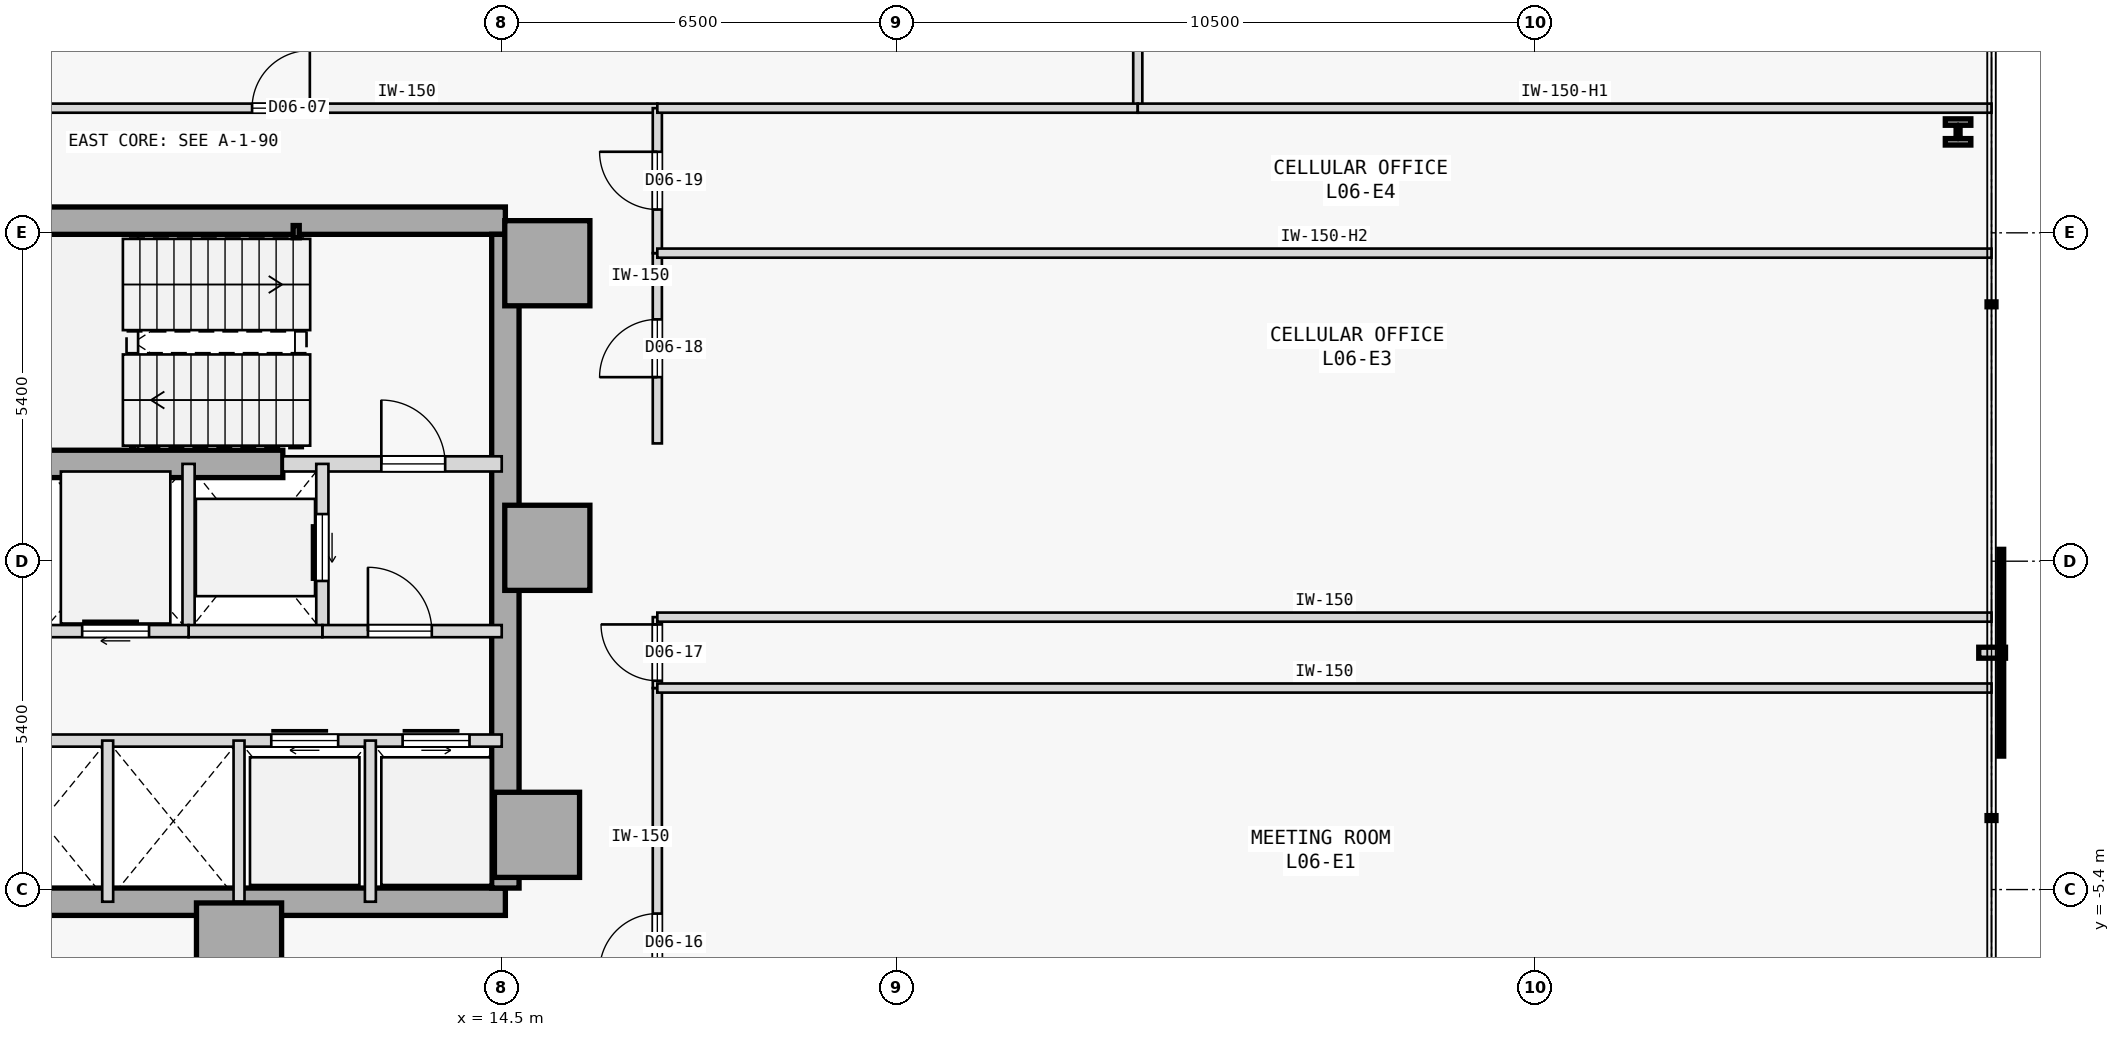
"""IFC4 building model, lengths in metres.
Left out: names, types, materials, properties, quantities, classifications, styles, units other than length and angle.
Written with IfcOpenShell. Run it as: python <this file> out.ifc"""

import sys

from ifc_helpers import new_model, si_unit, direction, frame, frame_2d, origin, origin_2d, place, context, subcontext, project, spatial, rectangle, hollow_rectangle, i_section, extrude, element, fill, save


model = new_model("IFC4")
c1 = context("Model", 3, precision=1e-05, world=origin(), true_north=direction((0.0, 1.0)))
c2 = subcontext(c1, "Body", "Model", "MODEL_VIEW")
j1 = project(units=[si_unit("LENGTHUNIT", "METRE"), si_unit("PLANEANGLEUNIT", "RADIAN")], contexts=[c1])
p1 = place(None, origin())
s1 = spatial("IfcSite", under=j1, at=p1, CompositionType="ELEMENT")
p2 = place(p1, origin())
s2 = spatial("IfcBuilding", under=s1, at=p2, CompositionType="ELEMENT")
p3 = place(p2, frame((0.0, 0.0, 29.4)))
s3 = spatial("IfcBuildingStorey", under=s2, at=p3, CompositionType="ELEMENT", Elevation=29.4)
for number, where, z_axis, x_axis in (
    (1, (15.25, 4.9, 0.0), (0.0, 0.0, 1.0), (1.0, 0.0, 0.0)),
    (2, (15.25, 0.22, 0.0), (0.0, 0.0, 1.0), (1.0, 0.0, 0.0)),
    (3, (15.08, -4.5, 0.0), (0.0, 0.0, 1.0), (1.0, 0.0, 0.0)),
    (4, (10.18, -6.32, 0.0), (0.0, 0.0, 1.0), (1.0, 0.0, 0.0)),
):
    element("IfcColumn", number, at=place(p3, frame(where, z_axis=z_axis, x_axis=x_axis)), inside=s3, PredefinedType="COLUMN", context=c2, shape_type="SweptSolid", body=[
        extrude(rectangle(XDim=1.4, YDim=1.4, at=origin_2d()), origin(), (0.0, 0.0, 1.0), 3.8),
    ])
p4 = place(p3, frame((3.15, 5.6, 0.0), z_axis=(0.0, 0.0, 1.0), x_axis=(1.0, 0.0, 0.0)))
e5 = element("IfcWall", 5, at=p4, inside=s3, PredefinedType="SHEAR", context=c2, shape_type="SweptSolid", body=[
    extrude(rectangle(XDim=11.41, YDim=0.45, at=frame_2d((5.705, 0.0))), origin(), (0.0, 0.0, 1.0), 3.575),
])
p5 = place(p3, frame((3.7, -5.6, 0.0), z_axis=(0.0, 0.0, 1.0), x_axis=(1.0, 0.0, 0.0)))
e6 = element("IfcWall", 6, at=p5, inside=s3, PredefinedType="SHEAR", context=c2, shape_type="SweptSolid", body=[
    extrude(rectangle(XDim=10.86, YDim=0.45, at=frame_2d((5.43, 0.0))), origin(), (0.0, 0.0, 1.0), 3.575),
])
p6 = place(p3, frame((14.56, -5.375, 0.0), z_axis=(0.0, 0.0, 1.0), x_axis=(0.0, 1.0, 0.0)))
e7 = element("IfcWall", 7, at=p6, inside=s3, PredefinedType="SHEAR", context=c2, shape_type="SweptSolid", body=[
    extrude(rectangle(XDim=10.75, YDim=0.45, at=frame_2d((5.375, 0.0))), origin(), (0.0, 0.0, 1.0), 3.575),
])
p7 = place(p3, frame((5.75, 1.6, 0.0), z_axis=(0.0, 0.0, 1.0), x_axis=(1.0, 0.0, 0.0)))
e8 = element("IfcWall", 8, at=p7, inside=s3, PredefinedType="SHEAR", context=c2, shape_type="SweptSolid", body=[
    extrude(rectangle(XDim=5.15, YDim=0.45, at=frame_2d((2.575, 0.0))), origin(), (0.0, 0.0, 1.0), 3.575),
])
p8 = place(p3, frame((11.12, 5.42, 0.0), z_axis=(0.0, 0.0, 1.0), x_axis=(1.0, 0.0, 0.0)))
e9 = element("IfcColumn", 9, at=p8, inside=s3, PredefinedType="COLUMN", context=c2, shape_type="SweptSolid", body=[
    extrude(hollow_rectangle(XDim=0.1, YDim=0.2, WallThickness=0.008, at=origin_2d()), origin(), (0.0, 0.0, 1.0), 3.8),
])
p9 = place(p3, frame((38.45, 7.059, 0.0), z_axis=(0.0, 0.0, 1.0), x_axis=(1.0, 0.0, 0.0)))
e10 = element("IfcColumn", 10, at=p9, inside=s3, PredefinedType="COLUMN", context=c2, shape_type="SweptSolid", body=[
    extrude(i_section(OverallWidth=0.42, OverallDepth=0.431, WebThickness=0.065, FlangeThickness=0.106, FilletRadius=0.015, at=origin_2d()), origin(), (0.0, 0.0, 1.0), 3.8),
])
p10 = place(p3, frame((10.9, 1.6, 0.0), z_axis=(0.0, 0.0, 1.0), x_axis=(1.0, 0.0, 0.0)))
e11 = element("IfcWall", 11, at=p10, inside=s3, PredefinedType="STANDARD", context=c2, shape_type="SweptSolid", body=[
    extrude(rectangle(XDim=3.6, YDim=0.25, at=frame_2d((1.8, 0.0))), origin(), (0.0, 0.0, 1.0), 3.575),
])
p11 = place(p10, frame((1.62, 0.0, 0.0)))
e12 = element("IfcOpeningElement", 12, at=p11, cuts=e11, PredefinedType="OPENING", context=c2, shape_type="SweptSolid", body=[
    extrude(rectangle(XDim=1.05, YDim=2.15, at=frame_2d((0.525, 1.075))), frame((0.0, 0.135, 0.0), z_axis=(0.0, -1.0, 0.0), x_axis=(1.0, 0.0, 0.0)), (0.0, 0.0, 1.0), 0.27),
])
p12 = place(p3, frame((11.55, -1.15, 0.0), z_axis=(0.0, 0.0, 1.0), x_axis=(0.0, 1.0, 0.0)))
e13 = element("IfcWall", 13, at=p12, inside=s3, PredefinedType="STANDARD", context=c2, shape_type="SweptSolid", body=[
    extrude(rectangle(XDim=2.75, YDim=0.2, at=frame_2d((1.375, 0.0))), origin(), (0.0, 0.0, 1.0), 3.575),
])
p13 = place(p12, frame((0.825, 0.0, 0.0)))
e14 = element("IfcOpeningElement", 14, at=p13, cuts=e13, PredefinedType="OPENING", context=c2, shape_type="SweptSolid", body=[
    extrude(rectangle(XDim=1.1, YDim=2.15, at=frame_2d((0.55, 1.075))), frame((0.0, 0.11, 0.0), z_axis=(0.0, -1.0, 0.0), x_axis=(1.0, 0.0, 0.0)), (0.0, 0.0, 1.0), 0.22),
])
p14 = place(p3, frame((9.35, -1.15, 0.0), z_axis=(0.0, 0.0, 1.0), x_axis=(0.0, 1.0, 0.0)))
e15 = element("IfcWall", 15, at=p14, inside=s3, PredefinedType="STANDARD", context=c2, shape_type="SweptSolid", body=[
    extrude(rectangle(XDim=2.75, YDim=0.2, at=frame_2d((1.375, 0.0))), origin(), (0.0, 0.0, 1.0), 3.575),
])
p15 = place(p3, frame((11.55, -1.15, 0.0), z_axis=(0.0, 0.0, 1.0), x_axis=(1.0, 0.0, 0.0)))
e16 = element("IfcWall", 16, at=p15, inside=s3, PredefinedType="STANDARD", context=c2, shape_type="SweptSolid", body=[
    extrude(rectangle(XDim=2.95, YDim=0.2, at=frame_2d((1.475, 0.0))), origin(), (0.0, 0.0, 1.0), 3.575),
])
p16 = place(p15, frame((0.75, 0.0, 0.0)))
e17 = element("IfcOpeningElement", 17, at=p16, cuts=e16, PredefinedType="OPENING", context=c2, shape_type="SweptSolid", body=[
    extrude(rectangle(XDim=1.05, YDim=2.18, at=frame_2d((0.525, 1.09))), frame((0.0, 0.11, 0.0), z_axis=(0.0, -1.0, 0.0), x_axis=(1.0, 0.0, 0.0)), (0.0, 0.0, 1.0), 0.22),
])
p17 = place(p3, frame((9.35, -1.15, 0.0), z_axis=(0.0, 0.0, 1.0), x_axis=(1.0, 0.0, 0.0)))
e18 = element("IfcWall", 18, at=p17, inside=s3, PredefinedType="STANDARD", context=c2, shape_type="SweptSolid", body=[
    extrude(rectangle(XDim=2.2, YDim=0.2, at=frame_2d((1.1, 0.0))), origin(), (0.0, 0.0, 1.0), 3.575),
])
p18 = place(p3, frame((6.95, -1.15, 0.0), z_axis=(0.0, 0.0, 1.0), x_axis=(1.0, 0.0, 0.0)))
e19 = element("IfcWall", 19, at=p18, inside=s3, PredefinedType="STANDARD", context=c2, shape_type="SweptSolid", body=[
    extrude(rectangle(XDim=2.4, YDim=0.2, at=frame_2d((1.2, 0.0))), origin(), (0.0, 0.0, 1.0), 3.575),
])
p19 = place(p18, frame((0.65, 0.0, 0.0)))
e20 = element("IfcOpeningElement", 20, at=p19, cuts=e19, PredefinedType="OPENING", context=c2, shape_type="SweptSolid", body=[
    extrude(rectangle(XDim=1.1, YDim=2.15, at=frame_2d((0.55, 1.075))), frame((0.0, 0.11, 0.0), z_axis=(0.0, -1.0, 0.0), x_axis=(1.0, 0.0, 0.0)), (0.0, 0.0, 1.0), 0.22),
])
p20 = place(p3, frame((3.7, -2.95, 0.0), z_axis=(0.0, 0.0, 1.0), x_axis=(1.0, 0.0, 0.0)))
e21 = element("IfcWall", 21, at=p20, inside=s3, PredefinedType="STANDARD", context=c2, shape_type="SweptSolid", body=[
    extrude(rectangle(XDim=10.8, YDim=0.2, at=frame_2d((5.4, 0.0))), origin(), (0.0, 0.0, 1.0), 3.575),
])
p21 = place(p20, frame((7.01, 0.0, 0.0)))
e22 = element("IfcOpeningElement", 22, at=p21, cuts=e21, PredefinedType="OPENING", context=c2, shape_type="SweptSolid", body=[
    extrude(rectangle(XDim=1.1, YDim=2.15, at=frame_2d((0.55, 1.075))), frame((0.0, 0.11, 0.0), z_axis=(0.0, -1.0, 0.0), x_axis=(1.0, 0.0, 0.0)), (0.0, 0.0, 1.0), 0.22),
])
p22 = place(p20, frame((9.17, 0.0, 0.0)))
e23 = element("IfcOpeningElement", 23, at=p22, cuts=e21, PredefinedType="OPENING", context=c2, shape_type="SweptSolid", body=[
    extrude(rectangle(XDim=1.1, YDim=2.15, at=frame_2d((0.55, 1.075))), frame((0.0, 0.11, 0.0), z_axis=(0.0, -1.0, 0.0), x_axis=(1.0, 0.0, 0.0)), (0.0, 0.0, 1.0), 0.22),
])
for number, where, z_axis, x_axis in (
    (24, (12.34, -5.6, 0.0), (0.0, 0.0, 1.0), (0.0, 1.0, 0.0)),
    (25, (10.18, -5.6, 0.0), (0.0, 0.0, 1.0), (0.0, 1.0, 0.0)),
    (26, (8.02, -5.6, 0.0), (0.0, 0.0, 1.0), (0.0, 1.0, 0.0)),
):
    element("IfcWall", number, at=place(p3, frame(where, z_axis=z_axis, x_axis=x_axis)), inside=s3, PredefinedType="STANDARD", context=c2, shape_type="SweptSolid", body=[
        extrude(rectangle(XDim=2.65, YDim=0.18, at=frame_2d((1.325, 0.0))), origin(), (0.0, 0.0, 1.0), 3.575),
    ])
p23 = place(p3, frame((4.68, 7.45, 0.0), z_axis=(0.0, 0.0, 1.0), x_axis=(1.0, 0.0, 0.0)))
e27 = element("IfcWall", 27, at=p23, inside=s3, PredefinedType="PARTITIONING", context=c2, shape_type="SweptSolid", body=[
    extrude(rectangle(XDim=12.379, YDim=0.15, at=frame_2d((6.189, 0.0))), origin(), (0.0, 0.0, 1.0), 3.575),
])
p24 = place(p23, frame((5.715, 0.0, 0.0)))
e28 = element("IfcOpeningElement", 28, at=p24, cuts=e27, PredefinedType="OPENING", context=c2, shape_type="SweptSolid", body=[
    extrude(rectangle(XDim=0.95, YDim=2.15, at=frame_2d((0.475, 1.075))), frame((0.0, 0.085, 0.0), z_axis=(0.0, -1.0, 0.0), x_axis=(1.0, 0.0, 0.0)), (0.0, 0.0, 1.0), 0.17),
])
p25 = place(p3, frame((17.059, -7.45, 0.0), z_axis=(0.0, 0.0, 1.0), x_axis=(0.0, 1.0, 0.0)))
e29 = element("IfcWall", 29, at=p25, inside=s3, PredefinedType="PARTITIONING", context=c2, shape_type="SweptSolid", body=[
    extrude(rectangle(XDim=5.364, YDim=0.15, at=frame_2d((2.682, 0.0))), origin(), (0.0, 0.0, 1.0), 3.575),
])
p26 = place(p25, frame((0.705, 0.0, 0.0)))
e30 = element("IfcOpeningElement", 30, at=p26, cuts=e29, PredefinedType="OPENING", context=c2, shape_type="SweptSolid", body=[
    extrude(rectangle(XDim=0.95, YDim=2.15, at=frame_2d((0.475, 1.075))), frame((0.0, 0.085, 0.0), z_axis=(0.0, -1.0, 0.0), x_axis=(1.0, 0.0, 0.0)), (0.0, 0.0, 1.0), 0.17),
])
p27 = place(p3, frame((17.059, -2.086, 0.0), z_axis=(0.0, 0.0, 1.0), x_axis=(0.0, 1.0, 0.0)))
e31 = element("IfcWall", 31, at=p27, inside=s3, PredefinedType="PARTITIONING", context=c2, shape_type="SweptSolid", body=[
    extrude(rectangle(XDim=1.166, YDim=0.15, at=frame_2d((0.583, 0.0))), origin(), (0.0, 0.0, 1.0), 3.575),
])
p28 = place(p27, frame((0.12, 0.0, 0.0)))
e32 = element("IfcOpeningElement", 32, at=p28, cuts=e31, PredefinedType="OPENING", context=c2, shape_type="SweptSolid", body=[
    extrude(rectangle(XDim=0.926, YDim=2.15, at=frame_2d((0.463, 1.075))), frame((0.0, 0.085, 0.0), z_axis=(0.0, -1.0, 0.0), x_axis=(1.0, 0.0, 0.0)), (0.0, 0.0, 1.0), 0.17),
])
p29 = place(p3, frame((17.059, -0.92, 0.0), z_axis=(0.0, 0.0, 1.0), x_axis=(1.0, 0.0, 0.0)))
e33 = element("IfcWall", 33, at=p29, inside=s3, PredefinedType="PARTITIONING", context=c2, shape_type="SweptSolid", body=[
    extrude(rectangle(XDim=21.941, YDim=0.15, at=frame_2d((10.97, 0.0))), origin(), (0.0, 0.0, 1.0), 3.575),
])
p30 = place(p3, frame((17.059, 1.937, 0.0), z_axis=(0.0, 0.0, 1.0), x_axis=(0.0, 1.0, 0.0)))
e34 = element("IfcWall", 34, at=p30, inside=s3, PredefinedType="PARTITIONING", context=c2, shape_type="SweptSolid", body=[
    extrude(rectangle(XDim=3.129, YDim=0.15, at=frame_2d((1.564, 0.0))), origin(), (0.0, 0.0, 1.0), 3.575),
])
p31 = place(p30, frame((1.09, 0.0, 0.0)))
e35 = element("IfcOpeningElement", 35, at=p31, cuts=e34, PredefinedType="OPENING", context=c2, shape_type="SweptSolid", body=[
    extrude(rectangle(XDim=0.95, YDim=2.15, at=frame_2d((0.475, 1.075))), frame((0.0, 0.085, 0.0), z_axis=(0.0, -1.0, 0.0), x_axis=(1.0, 0.0, 0.0)), (0.0, 0.0, 1.0), 0.17),
])
p32 = place(p3, frame((17.059, 5.066, 0.0), z_axis=(0.0, 0.0, 1.0), x_axis=(0.0, 1.0, 0.0)))
e36 = element("IfcWall", 36, at=p32, inside=s3, PredefinedType="PARTITIONING", context=c2, shape_type="SweptSolid", body=[
    extrude(rectangle(XDim=2.384, YDim=0.15, at=frame_2d((1.192, 0.0))), origin(), (0.0, 0.0, 1.0), 3.575),
])
p33 = place(p32, frame((0.717, 0.0, 0.0)))
e37 = element("IfcOpeningElement", 37, at=p33, cuts=e36, PredefinedType="OPENING", context=c2, shape_type="SweptSolid", body=[
    extrude(rectangle(XDim=0.95, YDim=2.15, at=frame_2d((0.475, 1.075))), frame((0.0, 0.085, 0.0), z_axis=(0.0, -1.0, 0.0), x_axis=(1.0, 0.0, 0.0)), (0.0, 0.0, 1.0), 0.17),
])
p34 = place(p3, frame((24.96, 7.45, 0.0), z_axis=(0.0, 0.0, 1.0), x_axis=(0.0, 1.0, 0.0)))
e38 = element("IfcWall", 38, at=p34, inside=s3, PredefinedType="PARTITIONING", context=c2, shape_type="SweptSolid", body=[
    extrude(rectangle(XDim=17.55, YDim=0.15, at=frame_2d((8.775, 0.0))), origin(), (0.0, 0.0, 1.0), 3.575),
])
p35 = place(p34, frame((8.3, 0.0, 0.0)))
e39 = element("IfcOpeningElement", 39, at=p35, cuts=e38, PredefinedType="OPENING", context=c2, shape_type="SweptSolid", body=[
    extrude(rectangle(XDim=0.95, YDim=2.15, at=frame_2d((0.475, 1.075))), frame((0.0, 0.085, 0.0), z_axis=(0.0, -1.0, 0.0), x_axis=(1.0, 0.0, 0.0)), (0.0, 0.0, 1.0), 0.17),
])
p36 = place(p3, frame((17.059, 7.45, 0.0), z_axis=(0.0, 0.0, 1.0), x_axis=(1.0, 0.0, 0.0)))
e40 = element("IfcWall", 40, at=p36, inside=s3, PredefinedType="PARTITIONING", context=c2, shape_type="SweptSolid", body=[
    extrude(rectangle(XDim=7.901, YDim=0.15, at=frame_2d((3.95, 0.0))), origin(), (0.0, 0.0, 1.0), 3.575),
])
p37 = place(p3, frame((24.96, 7.45, 0.0), z_axis=(0.0, 0.0, 1.0), x_axis=(1.0, 0.0, 0.0)))
e41 = element("IfcWall", 41, at=p37, inside=s3, PredefinedType="PARTITIONING", context=c2, shape_type="SweptSolid", body=[
    extrude(rectangle(XDim=14.04, YDim=0.15, at=frame_2d((7.02, 0.0))), origin(), (0.0, 0.0, 1.0), 3.125),
])
p38 = place(p3, frame((17.059, -2.086, 0.0), z_axis=(0.0, 0.0, 1.0), x_axis=(1.0, 0.0, 0.0)))
e42 = element("IfcWall", 42, at=p38, inside=s3, PredefinedType="PARTITIONING", context=c2, shape_type="SweptSolid", body=[
    extrude(rectangle(XDim=21.941, YDim=0.15, at=frame_2d((10.97, 0.0))), origin(), (0.0, 0.0, 1.0), 3.575),
])
p39 = place(p3, frame((17.059, 5.066, 0.0), z_axis=(0.0, 0.0, 1.0), x_axis=(1.0, 0.0, 0.0)))
e43 = element("IfcWall", 43, at=p39, inside=s3, PredefinedType="PARTITIONING", context=c2, shape_type="SweptSolid", body=[
    extrude(rectangle(XDim=21.941, YDim=0.15, at=frame_2d((10.97, 0.0))), origin(), (0.0, 0.0, 1.0), 2.975),
])
p40 = place(p11, origin())
e44 = element("IfcDoor", 44, at=p40, inside=s3, OperationType="SINGLE_SWING_LEFT", PredefinedType="DOOR", context=c2, shape_type="SweptSolid", body=[
    extrude(rectangle(XDim=1.05, YDim=2.15, at=frame_2d((0.525, 1.075))), frame((0.0, 0.025, 0.0), z_axis=(0.0, -1.0, 0.0), x_axis=(1.0, 0.0, 0.0)), (0.0, 0.0, 1.0), 0.05),
])
fill(e12, e44)
p41 = place(p16, origin())
e45 = element("IfcDoor", 45, at=p41, inside=s3, OperationType="SINGLE_SWING_LEFT", PredefinedType="DOOR", context=c2, shape_type="SweptSolid", body=[
    extrude(rectangle(XDim=1.05, YDim=2.18, at=frame_2d((0.525, 1.09))), frame((0.0, 0.025, 0.0), z_axis=(0.0, -1.0, 0.0), x_axis=(1.0, 0.0, 0.0)), (0.0, 0.0, 1.0), 0.05),
])
fill(e17, e45)
p42 = place(p13, origin())
e46 = element("IfcDoor", 46, at=p42, inside=s3, OperationType="SLIDING_TO_RIGHT", PredefinedType="DOOR", context=c2, shape_type="SweptSolid", body=[
    extrude(rectangle(XDim=1.1, YDim=2.15, at=frame_2d((0.55, 1.075))), frame((0.0, 0.025, 0.0), z_axis=(0.0, -1.0, 0.0), x_axis=(1.0, 0.0, 0.0)), (0.0, 0.0, 1.0), 0.05),
])
fill(e14, e46)
p43 = place(p19, origin())
e47 = element("IfcDoor", 47, at=p43, inside=s3, OperationType="SLIDING_TO_RIGHT", PredefinedType="DOOR", context=c2, shape_type="SweptSolid", body=[
    extrude(rectangle(XDim=1.1, YDim=2.15, at=frame_2d((0.55, 1.075))), frame((0.0, 0.025, 0.0), z_axis=(0.0, -1.0, 0.0), x_axis=(1.0, 0.0, 0.0)), (0.0, 0.0, 1.0), 0.05),
])
fill(e20, e47)
p44 = place(p21, origin())
e48 = element("IfcDoor", 48, at=p44, inside=s3, OperationType="SLIDING_TO_RIGHT", PredefinedType="DOOR", context=c2, shape_type="SweptSolid", body=[
    extrude(rectangle(XDim=1.1, YDim=2.15, at=frame_2d((0.55, 1.075))), frame((0.0, 0.025, 0.0), z_axis=(0.0, -1.0, 0.0), x_axis=(1.0, 0.0, 0.0)), (0.0, 0.0, 1.0), 0.05),
])
fill(e22, e48)
p45 = place(p22, origin())
e49 = element("IfcDoor", 49, at=p45, inside=s3, OperationType="SLIDING_TO_LEFT", PredefinedType="DOOR", context=c2, shape_type="SweptSolid", body=[
    extrude(rectangle(XDim=1.1, YDim=2.15, at=frame_2d((0.55, 1.075))), frame((0.0, 0.025, 0.0), z_axis=(0.0, -1.0, 0.0), x_axis=(1.0, 0.0, 0.0)), (0.0, 0.0, 1.0), 0.05),
])
fill(e23, e49)
p46 = place(p24, origin())
e50 = element("IfcDoor", 50, at=p46, inside=s3, OperationType="SINGLE_SWING_RIGHT", PredefinedType="DOOR", context=c2, shape_type="SweptSolid", body=[
    extrude(rectangle(XDim=0.95, YDim=2.15, at=frame_2d((0.475, 1.075))), frame((0.0, 0.025, 0.0), z_axis=(0.0, -1.0, 0.0), x_axis=(1.0, 0.0, 0.0)), (0.0, 0.0, 1.0), 0.05),
])
fill(e28, e50)
p47 = place(p26, origin())
e51 = element("IfcDoor", 51, at=p47, inside=s3, OperationType="SINGLE_SWING_LEFT", PredefinedType="DOOR", context=c2, shape_type="SweptSolid", body=[
    extrude(rectangle(XDim=0.95, YDim=2.15, at=frame_2d((0.475, 1.075))), frame((0.0, 0.025, 0.0), z_axis=(0.0, -1.0, 0.0), x_axis=(1.0, 0.0, 0.0)), (0.0, 0.0, 1.0), 0.05),
])
fill(e30, e51)
p48 = place(p28, origin())
e52 = element("IfcDoor", 52, at=p48, inside=s3, OperationType="SINGLE_SWING_RIGHT", PredefinedType="DOOR", context=c2, shape_type="SweptSolid", body=[
    extrude(rectangle(XDim=0.926, YDim=2.15, at=frame_2d((0.463, 1.075))), frame((0.0, 0.025, 0.0), z_axis=(0.0, -1.0, 0.0), x_axis=(1.0, 0.0, 0.0)), (0.0, 0.0, 1.0), 0.05),
])
fill(e32, e52)
p49 = place(p31, origin())
e53 = element("IfcDoor", 53, at=p49, inside=s3, OperationType="SINGLE_SWING_LEFT", PredefinedType="DOOR", context=c2, shape_type="SweptSolid", body=[
    extrude(rectangle(XDim=0.95, YDim=2.15, at=frame_2d((0.475, 1.075))), frame((0.0, 0.025, 0.0), z_axis=(0.0, -1.0, 0.0), x_axis=(1.0, 0.0, 0.0)), (0.0, 0.0, 1.0), 0.05),
])
fill(e35, e53)
p50 = place(p33, origin())
e54 = element("IfcDoor", 54, at=p50, inside=s3, OperationType="SINGLE_SWING_RIGHT", PredefinedType="DOOR", context=c2, shape_type="SweptSolid", body=[
    extrude(rectangle(XDim=0.95, YDim=2.15, at=frame_2d((0.475, 1.075))), frame((0.0, 0.025, 0.0), z_axis=(0.0, -1.0, 0.0), x_axis=(1.0, 0.0, 0.0)), (0.0, 0.0, 1.0), 0.05),
])
fill(e37, e54)
save(model, sys.argv[1])
